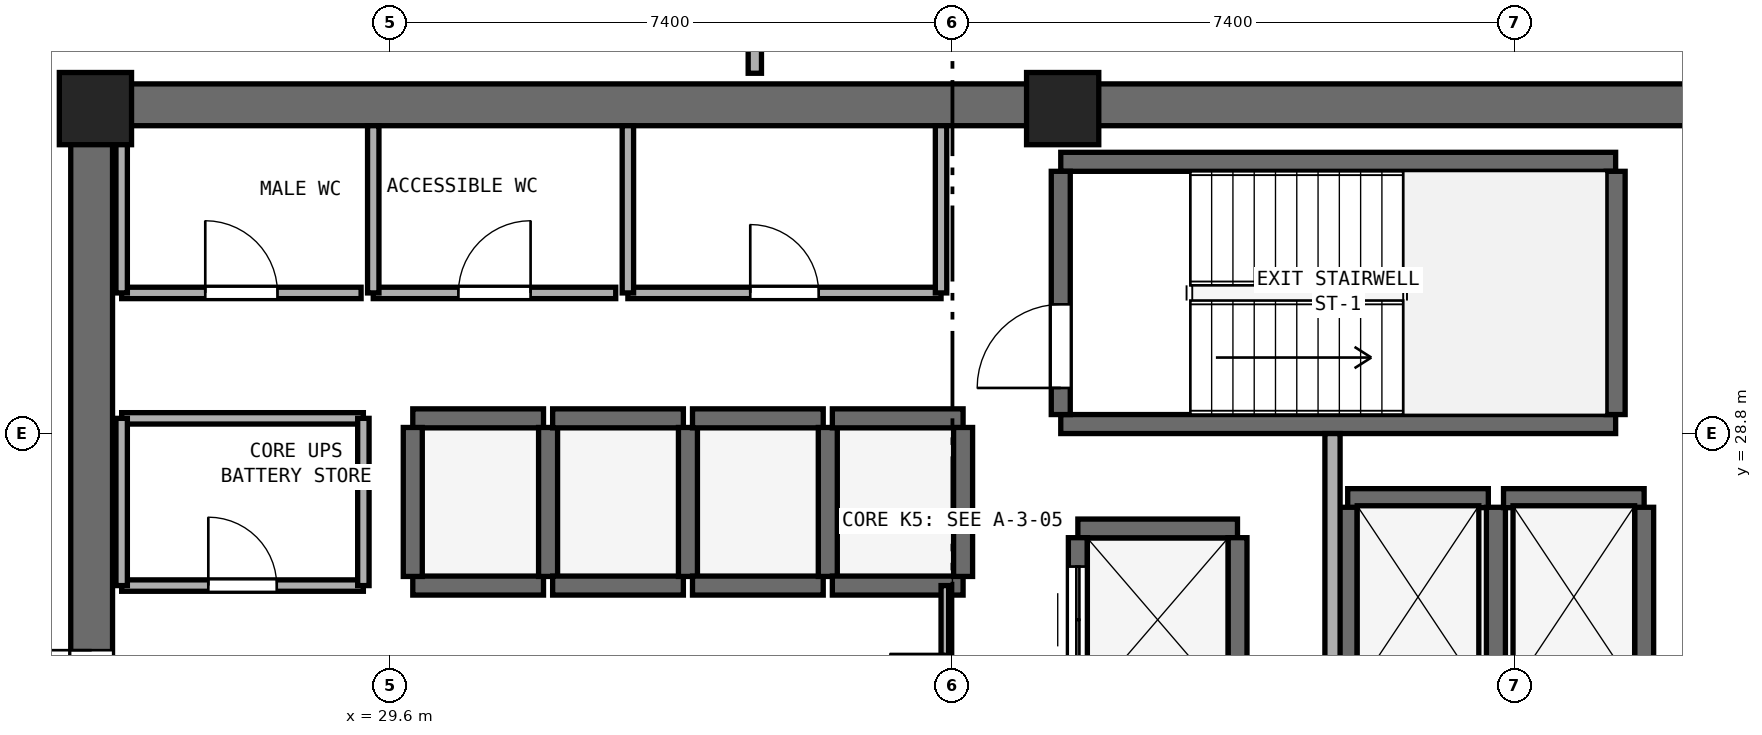
"""IFC4 building model, lengths in metres.
Left out: names, types, materials, properties, quantities, classifications, styles, units other than length and angle.
Written with IfcOpenShell. Run it as: python <this file> out.ifc"""

import sys

from ifc_helpers import new_model, si_unit, direction, frame, frame_2d, origin, origin_2d, place, context, subcontext, project, spatial, rectangle, extrude, element, fill, save


model = new_model("IFC4")
c1 = context("Model", 3, precision=1e-05, world=origin(), true_north=direction((0.0, 1.0)))
c2 = subcontext(c1, "Body", "Model", "MODEL_VIEW")
j1 = project(units=[si_unit("LENGTHUNIT", "METRE"), si_unit("PLANEANGLEUNIT", "RADIAN")], contexts=[c1])
p1 = place(None, origin())
s1 = spatial("IfcSite", under=j1, at=p1, CompositionType="ELEMENT")
p2 = place(p1, origin())
s2 = spatial("IfcBuilding", under=s1, at=p2, CompositionType="ELEMENT")
p3 = place(p2, frame((0.0, 0.0, 163.0)))
s3 = spatial("IfcBuildingStorey", under=s2, at=p3, CompositionType="ELEMENT", Elevation=163.0)
p4 = place(p3, frame((25.4, 33.125, 0.0), z_axis=(0.0, 0.0, 1.0), x_axis=(1.0, 0.0, 0.0)))
e1 = element("IfcWall", 1, at=p4, inside=s3, PredefinedType="SHEAR", context=c2, shape_type="SweptSolid", body=[
    extrude(rectangle(XDim=23.2, YDim=0.55, at=frame_2d((11.6, 0.0))), origin(), (0.0, 0.0, 1.0), 3.54),
])
p5 = place(p3, frame((25.675, 17.55, 0.0), z_axis=(0.0, 0.0, 1.0), x_axis=(0.0, 1.0, 0.0)))
e2 = element("IfcWall", 2, at=p5, inside=s3, PredefinedType="SHEAR", context=c2, shape_type="SweptSolid", body=[
    extrude(rectangle(XDim=15.3, YDim=0.55, at=frame_2d((7.65, 0.0))), origin(), (0.0, 0.0, 1.0), 3.54),
])
p6 = place(p5, frame((6.9, 0.0, 0.0)))
e3 = element("IfcOpeningElement", 3, at=p6, cuts=e2, PredefinedType="OPENING", context=c2, shape_type="SweptSolid", body=[
    extrude(rectangle(XDim=1.5, YDim=2.15, at=frame_2d((0.75, 1.075))), frame((0.0, 0.285, 0.0), z_axis=(0.0, -1.0, 0.0), x_axis=(1.0, 0.0, 0.0)), (0.0, 0.0, 1.0), 0.57),
])
for number, where, z_axis, x_axis in (
    (4, (38.45, 33.075, 0.0), (0.0, 0.0, 1.0), (1.0, 0.0, 0.0)),
    (5, (25.725, 33.075, 0.0), (0.0, 0.0, 1.0), (1.0, 0.0, 0.0)),
):
    element("IfcColumn", number, at=place(p3, frame(where, z_axis=z_axis, x_axis=x_axis)), inside=s3, PredefinedType="PILASTER", context=c2, shape_type="SweptSolid", body=[
        extrude(rectangle(XDim=0.95, YDim=0.95, at=origin_2d()), origin(), (0.0, 0.0, 1.0), 3.8),
    ])
for number, where, z_axis, x_axis in (
    (6, (38.425, 28.925, 0.0), (0.0, 0.0, 1.0), (1.0, 0.0, 0.0)),
    (7, (38.425, 32.375, 0.0), (0.0, 0.0, 1.0), (1.0, 0.0, 0.0)),
):
    element("IfcWall", number, at=place(p3, frame(where, z_axis=z_axis, x_axis=x_axis)), inside=s3, PredefinedType="SHEAR", context=c2, shape_type="SweptSolid", body=[
        extrude(rectangle(XDim=7.3, YDim=0.25, at=frame_2d((3.65, 0.0))), origin(), (0.0, 0.0, 1.0), 3.54),
    ])
p7 = place(p3, frame((38.425, 29.05, 0.0), z_axis=(0.0, 0.0, 1.0), x_axis=(0.0, 1.0, 0.0)))
e8 = element("IfcWall", 8, at=p7, inside=s3, PredefinedType="SHEAR", context=c2, shape_type="SweptSolid", body=[
    extrude(rectangle(XDim=3.2, YDim=0.25, at=frame_2d((1.6, 0.0))), origin(), (0.0, 0.0, 1.0), 3.54),
])
p8 = place(p7, frame((0.35, 0.0, 0.0)))
e9 = element("IfcOpeningElement", 9, at=p8, cuts=e8, PredefinedType="OPENING", context=c2, shape_type="SweptSolid", body=[
    extrude(rectangle(XDim=1.1, YDim=2.15, at=frame_2d((0.55, 1.075))), frame((0.0, 0.135, 0.0), z_axis=(0.0, -1.0, 0.0), x_axis=(1.0, 0.0, 0.0)), (0.0, 0.0, 1.0), 0.27),
])
p9 = place(p3, frame((45.725, 29.05, 0.0), z_axis=(0.0, 0.0, 1.0), x_axis=(0.0, 1.0, 0.0)))
e10 = element("IfcWall", 10, at=p9, inside=s3, PredefinedType="SHEAR", context=c2, shape_type="SweptSolid", body=[
    extrude(rectangle(XDim=3.2, YDim=0.25, at=frame_2d((1.6, 0.0))), origin(), (0.0, 0.0, 1.0), 3.54),
])
for number, where, z_axis, x_axis in (
    (11, (29.9, 26.8, 0.0), (0.0, 0.0, 1.0), (1.0, 0.0, 0.0)),
    (12, (29.9, 29.0, 0.0), (0.0, 0.0, 1.0), (1.0, 0.0, 0.0)),
):
    element("IfcWall", number, at=place(p3, frame(where, z_axis=z_axis, x_axis=x_axis)), inside=s3, PredefinedType="SHEAR", context=c2, shape_type="SweptSolid", body=[
        extrude(rectangle(XDim=1.72, YDim=0.25, at=frame_2d((0.86, 0.0))), origin(), (0.0, 0.0, 1.0), 3.54),
    ])
for number, where, z_axis, x_axis in (
    (13, (29.9, 26.92, 0.0), (0.0, 0.0, 1.0), (0.0, 1.0, 0.0)),
    (14, (31.68, 26.92, 0.0), (0.0, 0.0, 1.0), (0.0, 1.0, 0.0)),
):
    element("IfcWall", number, at=place(p3, frame(where, z_axis=z_axis, x_axis=x_axis)), inside=s3, PredefinedType="SHEAR", context=c2, shape_type="SweptSolid", body=[
        extrude(rectangle(XDim=1.96, YDim=0.25, at=frame_2d((0.98, 0.0))), origin(), (0.0, 0.0, 1.0), 3.54),
    ])
for number, where, z_axis, x_axis in (
    (15, (31.74, 26.8, 0.0), (0.0, 0.0, 1.0), (1.0, 0.0, 0.0)),
    (16, (31.74, 29.0, 0.0), (0.0, 0.0, 1.0), (1.0, 0.0, 0.0)),
):
    element("IfcWall", number, at=place(p3, frame(where, z_axis=z_axis, x_axis=x_axis)), inside=s3, PredefinedType="SHEAR", context=c2, shape_type="SweptSolid", body=[
        extrude(rectangle(XDim=1.72, YDim=0.25, at=frame_2d((0.86, 0.0))), origin(), (0.0, 0.0, 1.0), 3.54),
    ])
p10 = place(p3, frame((33.52, 26.92, 0.0), z_axis=(0.0, 0.0, 1.0), x_axis=(0.0, 1.0, 0.0)))
e17 = element("IfcWall", 17, at=p10, inside=s3, PredefinedType="SHEAR", context=c2, shape_type="SweptSolid", body=[
    extrude(rectangle(XDim=1.96, YDim=0.25, at=frame_2d((0.98, 0.0))), origin(), (0.0, 0.0, 1.0), 3.54),
])
for number, where, z_axis, x_axis in (
    (18, (33.58, 26.8, 0.0), (0.0, 0.0, 1.0), (1.0, 0.0, 0.0)),
    (19, (33.58, 29.0, 0.0), (0.0, 0.0, 1.0), (1.0, 0.0, 0.0)),
):
    element("IfcWall", number, at=place(p3, frame(where, z_axis=z_axis, x_axis=x_axis)), inside=s3, PredefinedType="SHEAR", context=c2, shape_type="SweptSolid", body=[
        extrude(rectangle(XDim=1.72, YDim=0.25, at=frame_2d((0.86, 0.0))), origin(), (0.0, 0.0, 1.0), 3.54),
    ])
p11 = place(p3, frame((35.36, 26.92, 0.0), z_axis=(0.0, 0.0, 1.0), x_axis=(0.0, 1.0, 0.0)))
e20 = element("IfcWall", 20, at=p11, inside=s3, PredefinedType="SHEAR", context=c2, shape_type="SweptSolid", body=[
    extrude(rectangle(XDim=1.96, YDim=0.25, at=frame_2d((0.98, 0.0))), origin(), (0.0, 0.0, 1.0), 3.54),
])
for number, where, z_axis, x_axis in (
    (21, (35.42, 26.8, 0.0), (0.0, 0.0, 1.0), (1.0, 0.0, 0.0)),
    (22, (35.42, 29.0, 0.0), (0.0, 0.0, 1.0), (1.0, 0.0, 0.0)),
):
    element("IfcWall", number, at=place(p3, frame(where, z_axis=z_axis, x_axis=x_axis)), inside=s3, PredefinedType="SHEAR", context=c2, shape_type="SweptSolid", body=[
        extrude(rectangle(XDim=1.72, YDim=0.25, at=frame_2d((0.86, 0.0))), origin(), (0.0, 0.0, 1.0), 3.54),
    ])
p12 = place(p3, frame((37.14, 26.92, 0.0), z_axis=(0.0, 0.0, 1.0), x_axis=(0.0, 1.0, 0.0)))
e23 = element("IfcWall", 23, at=p12, inside=s3, PredefinedType="SHEAR", context=c2, shape_type="SweptSolid", body=[
    extrude(rectangle(XDim=1.96, YDim=0.25, at=frame_2d((0.98, 0.0))), origin(), (0.0, 0.0, 1.0), 3.54),
])
p13 = place(p3, frame((42.2, 27.95, 0.0), z_axis=(0.0, 0.0, 1.0), x_axis=(1.0, 0.0, 0.0)))
e24 = element("IfcWall", 24, at=p13, inside=s3, PredefinedType="SHEAR", context=c2, shape_type="SweptSolid", body=[
    extrude(rectangle(XDim=1.85, YDim=0.25, at=frame_2d((0.925, 0.0))), origin(), (0.0, 0.0, 1.0), 3.54),
])
for number, where, z_axis, x_axis in (
    (25, (42.2, 25.47, 0.0), (0.0, 0.0, 1.0), (0.0, 1.0, 0.0)),
    (26, (44.15, 25.47, 0.0), (0.0, 0.0, 1.0), (0.0, 1.0, 0.0)),
):
    element("IfcWall", number, at=place(p3, frame(where, z_axis=z_axis, x_axis=x_axis)), inside=s3, PredefinedType="SHEAR", context=c2, shape_type="SweptSolid", body=[
        extrude(rectangle(XDim=2.36, YDim=0.25, at=frame_2d((1.18, 0.0))), origin(), (0.0, 0.0, 1.0), 3.54),
    ])
p14 = place(p3, frame((44.25, 27.95, 0.0), z_axis=(0.0, 0.0, 1.0), x_axis=(1.0, 0.0, 0.0)))
e27 = element("IfcWall", 27, at=p14, inside=s3, PredefinedType="SHEAR", context=c2, shape_type="SweptSolid", body=[
    extrude(rectangle(XDim=1.85, YDim=0.25, at=frame_2d((0.925, 0.0))), origin(), (0.0, 0.0, 1.0), 3.54),
])
p15 = place(p3, frame((46.1, 25.47, 0.0), z_axis=(0.0, 0.0, 1.0), x_axis=(0.0, 1.0, 0.0)))
e28 = element("IfcWall", 28, at=p15, inside=s3, PredefinedType="SHEAR", context=c2, shape_type="SweptSolid", body=[
    extrude(rectangle(XDim=2.36, YDim=0.25, at=frame_2d((1.18, 0.0))), origin(), (0.0, 0.0, 1.0), 3.54),
])
p16 = place(p3, frame((38.65, 27.55, 0.0), z_axis=(0.0, 0.0, 1.0), x_axis=(1.0, 0.0, 0.0)))
e29 = element("IfcWall", 29, at=p16, inside=s3, PredefinedType="SHEAR", context=c2, shape_type="SweptSolid", body=[
    extrude(rectangle(XDim=2.1, YDim=0.25, at=frame_2d((1.05, 0.0))), origin(), (0.0, 0.0, 1.0), 3.54),
])
p17 = place(p3, frame((38.65, 25.27, 0.0), z_axis=(0.0, 0.0, 1.0), x_axis=(0.0, 1.0, 0.0)))
e30 = element("IfcWall", 30, at=p17, inside=s3, PredefinedType="SHEAR", context=c2, shape_type="SweptSolid", body=[
    extrude(rectangle(XDim=2.16, YDim=0.25, at=frame_2d((1.08, 0.0))), origin(), (0.0, 0.0, 1.0), 3.54),
])
p18 = place(p17, frame((0.38, 0.0, 0.0)))
e31 = element("IfcOpeningElement", 31, at=p18, cuts=e30, PredefinedType="OPENING", context=c2, shape_type="SweptSolid", body=[
    extrude(rectangle(XDim=1.4, YDim=2.2, at=frame_2d((0.7, 1.1))), frame((0.0, 0.135, 0.0), z_axis=(0.0, -1.0, 0.0), x_axis=(1.0, 0.0, 0.0)), (0.0, 0.0, 1.0), 0.27),
])
p19 = place(p3, frame((40.75, 25.27, 0.0), z_axis=(0.0, 0.0, 1.0), x_axis=(0.0, 1.0, 0.0)))
e32 = element("IfcWall", 32, at=p19, inside=s3, PredefinedType="SHEAR", context=c2, shape_type="SweptSolid", body=[
    extrude(rectangle(XDim=2.16, YDim=0.25, at=frame_2d((1.08, 0.0))), origin(), (0.0, 0.0, 1.0), 3.54),
])
p20 = place(p3, frame((42.0, 22.75, 0.0), z_axis=(0.0, 0.0, 1.0), x_axis=(0.0, 1.0, 0.0)))
e33 = element("IfcWall", 33, at=p20, inside=s3, PredefinedType="SOLIDWALL", context=c2, shape_type="SweptSolid", body=[
    extrude(rectangle(XDim=6.05, YDim=0.2, at=frame_2d((3.025, 0.0))), origin(), (0.0, 0.0, 1.0), 3.54),
])
p21 = place(p20, frame((0.65, 0.0, 0.0)))
e34 = element("IfcOpeningElement", 34, at=p21, cuts=e33, PredefinedType="OPENING", context=c2, shape_type="SweptSolid", body=[
    extrude(rectangle(XDim=1.2, YDim=2.15, at=frame_2d((0.6, 1.075))), frame((0.0, 0.11, 0.0), z_axis=(0.0, -1.0, 0.0), x_axis=(1.0, 0.0, 0.0)), (0.0, 0.0, 1.0), 0.22),
])
p22 = place(p3, frame((26.07, 30.65, 0.0), z_axis=(0.0, 0.0, 1.0), x_axis=(1.0, 0.0, 0.0)))
e35 = element("IfcWall", 35, at=p22, inside=s3, PredefinedType="PARTITIONING", context=c2, shape_type="SweptSolid", body=[
    extrude(rectangle(XDim=3.15, YDim=0.15, at=frame_2d((1.575, 0.0))), origin(), (0.0, 0.0, 1.0), 3.54),
])
p23 = place(p22, frame((1.1, 0.0, 0.0)))
e36 = element("IfcOpeningElement", 36, at=p23, cuts=e35, PredefinedType="OPENING", context=c2, shape_type="SweptSolid", body=[
    extrude(rectangle(XDim=0.95, YDim=2.1, at=frame_2d((0.475, 1.05))), frame((0.0, 0.085, 0.0), z_axis=(0.0, -1.0, 0.0), x_axis=(1.0, 0.0, 0.0)), (0.0, 0.0, 1.0), 0.17),
])
p24 = place(p3, frame((26.07, 30.65, 0.0), z_axis=(0.0, 0.0, 1.0), x_axis=(0.0, 1.0, 0.0)))
e37 = element("IfcWall", 37, at=p24, inside=s3, PredefinedType="PARTITIONING", context=c2, shape_type="SweptSolid", body=[
    extrude(rectangle(XDim=2.2, YDim=0.15, at=frame_2d((1.1, 0.0))), origin(), (0.0, 0.0, 1.0), 2.64),
])
p25 = place(p3, frame((29.38, 30.65, 0.0), z_axis=(0.0, 0.0, 1.0), x_axis=(1.0, 0.0, 0.0)))
e38 = element("IfcWall", 38, at=p25, inside=s3, PredefinedType="PARTITIONING", context=c2, shape_type="SweptSolid", body=[
    extrude(rectangle(XDim=3.19, YDim=0.15, at=frame_2d((1.595, 0.0))), origin(), (0.0, 0.0, 1.0), 3.54),
])
p26 = place(p25, frame((1.12, 0.0, 0.0)))
e39 = element("IfcOpeningElement", 39, at=p26, cuts=e38, PredefinedType="OPENING", context=c2, shape_type="SweptSolid", body=[
    extrude(rectangle(XDim=0.95, YDim=2.1, at=frame_2d((0.475, 1.05))), frame((0.0, 0.085, 0.0), z_axis=(0.0, -1.0, 0.0), x_axis=(1.0, 0.0, 0.0)), (0.0, 0.0, 1.0), 0.17),
])
p27 = place(p3, frame((29.38, 30.65, 0.0), z_axis=(0.0, 0.0, 1.0), x_axis=(0.0, 1.0, 0.0)))
e40 = element("IfcWall", 40, at=p27, inside=s3, PredefinedType="PARTITIONING", context=c2, shape_type="SweptSolid", body=[
    extrude(rectangle(XDim=2.2, YDim=0.15, at=frame_2d((1.1, 0.0))), origin(), (0.0, 0.0, 1.0), 3.54),
])
p28 = place(p3, frame((32.73, 30.65, 0.0), z_axis=(0.0, 0.0, 1.0), x_axis=(1.0, 0.0, 0.0)))
e41 = element("IfcWall", 41, at=p28, inside=s3, PredefinedType="PARTITIONING", context=c2, shape_type="SweptSolid", body=[
    extrude(rectangle(XDim=4.12, YDim=0.15, at=frame_2d((2.06, 0.0))), origin(), (0.0, 0.0, 1.0), 3.54),
])
p29 = place(p28, frame((1.61, 0.0, 0.0)))
e42 = element("IfcOpeningElement", 42, at=p29, cuts=e41, PredefinedType="OPENING", context=c2, shape_type="SweptSolid", body=[
    extrude(rectangle(XDim=0.9, YDim=2.1, at=frame_2d((0.45, 1.05))), frame((0.0, 0.085, 0.0), z_axis=(0.0, -1.0, 0.0), x_axis=(1.0, 0.0, 0.0)), (0.0, 0.0, 1.0), 0.17),
])
for number, where, z_axis, x_axis in (
    (43, (32.73, 30.65, 0.0), (0.0, 0.0, 1.0), (0.0, 1.0, 0.0)),
    (44, (36.85, 30.65, 0.0), (0.0, 0.0, 1.0), (0.0, 1.0, 0.0)),
):
    element("IfcWall", number, at=place(p3, frame(where, z_axis=z_axis, x_axis=x_axis)), inside=s3, PredefinedType="PARTITIONING", context=c2, shape_type="SweptSolid", body=[
        extrude(rectangle(XDim=2.2, YDim=0.15, at=frame_2d((1.1, 0.0))), origin(), (0.0, 0.0, 1.0), 3.54),
    ])
p30 = place(p3, frame((26.07, 26.8, 0.0), z_axis=(0.0, 0.0, 1.0), x_axis=(1.0, 0.0, 0.0)))
e45 = element("IfcWall", 45, at=p30, inside=s3, PredefinedType="PARTITIONING", context=c2, shape_type="SweptSolid", body=[
    extrude(rectangle(XDim=3.18, YDim=0.15, at=frame_2d((1.59, 0.0))), origin(), (0.0, 0.0, 1.0), 3.54),
])
p31 = place(p30, frame((1.14, 0.0, 0.0)))
e46 = element("IfcOpeningElement", 46, at=p31, cuts=e45, PredefinedType="OPENING", context=c2, shape_type="SweptSolid", body=[
    extrude(rectangle(XDim=0.9, YDim=2.1, at=frame_2d((0.45, 1.05))), frame((0.0, 0.085, 0.0), z_axis=(0.0, -1.0, 0.0), x_axis=(1.0, 0.0, 0.0)), (0.0, 0.0, 1.0), 0.17),
])
p32 = place(p3, frame((26.07, 29.0, 0.0), z_axis=(0.0, 0.0, 1.0), x_axis=(1.0, 0.0, 0.0)))
e47 = element("IfcWall", 47, at=p32, inside=s3, PredefinedType="PARTITIONING", context=c2, shape_type="SweptSolid", body=[
    extrude(rectangle(XDim=3.18, YDim=0.15, at=frame_2d((1.59, 0.0))), origin(), (0.0, 0.0, 1.0), 3.54),
])
p33 = place(p3, frame((26.07, 26.8, 0.0), z_axis=(0.0, 0.0, 1.0), x_axis=(0.0, 1.0, 0.0)))
e48 = element("IfcWall", 48, at=p33, inside=s3, PredefinedType="PARTITIONING", context=c2, shape_type="SweptSolid", body=[
    extrude(rectangle(XDim=2.2, YDim=0.15, at=frame_2d((1.1, 0.0))), origin(), (0.0, 0.0, 1.0), 2.64),
])
p34 = place(p3, frame((29.25, 26.8, 0.0), z_axis=(0.0, 0.0, 1.0), x_axis=(0.0, 1.0, 0.0)))
e49 = element("IfcWall", 49, at=p34, inside=s3, PredefinedType="PARTITIONING", context=c2, shape_type="SweptSolid", body=[
    extrude(rectangle(XDim=2.2, YDim=0.15, at=frame_2d((1.1, 0.0))), origin(), (0.0, 0.0, 1.0), 3.54),
])
p35 = place(p3, frame((36.9, 23.6, 0.0), z_axis=(0.0, 0.0, 1.0), x_axis=(0.0, 1.0, 0.0)))
e50 = element("IfcWall", 50, at=p35, inside=s3, PredefinedType="PARTITIONING", context=c2, shape_type="SweptSolid", body=[
    extrude(rectangle(XDim=3.2, YDim=0.1, at=frame_2d((1.6, 0.0))), origin(), (0.0, 0.0, 1.0), 3.54),
])
p36 = place(p35, frame((0.85, 0.0, 0.0)))
e51 = element("IfcOpeningElement", 51, at=p36, cuts=e50, PredefinedType="OPENING", context=c2, shape_type="SweptSolid", body=[
    extrude(rectangle(XDim=1.45, YDim=2.12, at=frame_2d((0.725, 1.06))), frame((0.0, 0.06, 0.0), z_axis=(0.0, -1.0, 0.0), x_axis=(1.0, 0.0, 0.0)), (0.0, 0.0, 1.0), 0.12),
])
p37 = place(p3, frame((34.4, 33.54, 0.0), z_axis=(0.0, 0.0, 1.0), x_axis=(0.0, 1.0, 0.0)))
e52 = element("IfcWall", 52, at=p37, inside=s3, PredefinedType="PARTITIONING", context=c2, shape_type="SweptSolid", body=[
    extrude(rectangle(XDim=3.31, YDim=0.175, at=frame_2d((1.655, 0.0))), origin(), (0.0, 0.0, 1.0), 3.54),
])
p38 = place(p8, origin())
e53 = element("IfcDoor", 53, at=p38, inside=s3, OperationType="SINGLE_SWING_LEFT", PredefinedType="DOOR", context=c2, shape_type="SweptSolid", body=[
    extrude(rectangle(XDim=1.1, YDim=2.15, at=frame_2d((0.55, 1.075))), frame((0.0, 0.025, 0.0), z_axis=(0.0, -1.0, 0.0), x_axis=(1.0, 0.0, 0.0)), (0.0, 0.0, 1.0), 0.05),
])
fill(e9, e53)
p39 = place(p18, origin())
e54 = element("IfcDoor", 54, at=p39, inside=s3, OperationType="DOUBLE_DOOR_SLIDING", PredefinedType="DOOR", context=c2, shape_type="SweptSolid", body=[
    extrude(rectangle(XDim=1.4, YDim=2.2, at=frame_2d((0.7, 1.1))), frame((0.0, 0.025, 0.0), z_axis=(0.0, -1.0, 0.0), x_axis=(1.0, 0.0, 0.0)), (0.0, 0.0, 1.0), 0.05),
])
fill(e31, e54)
p40 = place(p6, origin())
e55 = element("IfcDoor", 55, at=p40, inside=s3, OperationType="DOUBLE_DOOR_SINGLE_SWING", PredefinedType="DOOR", context=c2, shape_type="SweptSolid", body=[
    extrude(rectangle(XDim=1.5, YDim=2.15, at=frame_2d((0.75, 1.075))), frame((0.0, 0.025, 0.0), z_axis=(0.0, -1.0, 0.0), x_axis=(1.0, 0.0, 0.0)), (0.0, 0.0, 1.0), 0.05),
])
fill(e3, e55)
p41 = place(p23, origin())
e56 = element("IfcDoor", 56, at=p41, inside=s3, OperationType="SINGLE_SWING_LEFT", PredefinedType="DOOR", context=c2, shape_type="SweptSolid", body=[
    extrude(rectangle(XDim=0.95, YDim=2.1, at=frame_2d((0.475, 1.05))), frame((0.0, 0.025, 0.0), z_axis=(0.0, -1.0, 0.0), x_axis=(1.0, 0.0, 0.0)), (0.0, 0.0, 1.0), 0.05),
])
fill(e36, e56)
p42 = place(p26, origin())
e57 = element("IfcDoor", 57, at=p42, inside=s3, OperationType="SINGLE_SWING_RIGHT", PredefinedType="DOOR", context=c2, shape_type="SweptSolid", body=[
    extrude(rectangle(XDim=0.95, YDim=2.1, at=frame_2d((0.475, 1.05))), frame((0.0, 0.025, 0.0), z_axis=(0.0, -1.0, 0.0), x_axis=(1.0, 0.0, 0.0)), (0.0, 0.0, 1.0), 0.05),
])
fill(e39, e57)
p43 = place(p29, origin())
e58 = element("IfcDoor", 58, at=p43, inside=s3, OperationType="SINGLE_SWING_LEFT", PredefinedType="DOOR", context=c2, shape_type="SweptSolid", body=[
    extrude(rectangle(XDim=0.9, YDim=2.1, at=frame_2d((0.45, 1.05))), frame((0.0, 0.025, 0.0), z_axis=(0.0, -1.0, 0.0), x_axis=(1.0, 0.0, 0.0)), (0.0, 0.0, 1.0), 0.05),
])
fill(e42, e58)
p44 = place(p31, origin())
e59 = element("IfcDoor", 59, at=p44, inside=s3, OperationType="SINGLE_SWING_LEFT", PredefinedType="DOOR", context=c2, shape_type="SweptSolid", body=[
    extrude(rectangle(XDim=0.9, YDim=2.1, at=frame_2d((0.45, 1.05))), frame((0.0, 0.025, 0.0), z_axis=(0.0, -1.0, 0.0), x_axis=(1.0, 0.0, 0.0)), (0.0, 0.0, 1.0), 0.05),
])
fill(e46, e59)
p45 = place(p36, origin())
e60 = element("IfcDoor", 60, at=p45, inside=s3, OperationType="DOUBLE_DOOR_SINGLE_SWING", PredefinedType="DOOR", context=c2, shape_type="SweptSolid", body=[
    extrude(rectangle(XDim=1.45, YDim=2.12, at=frame_2d((0.725, 1.06))), frame((0.0, 0.025, 0.0), z_axis=(0.0, -1.0, 0.0), x_axis=(1.0, 0.0, 0.0)), (0.0, 0.0, 1.0), 0.05),
])
fill(e51, e60)
save(model, sys.argv[1])
